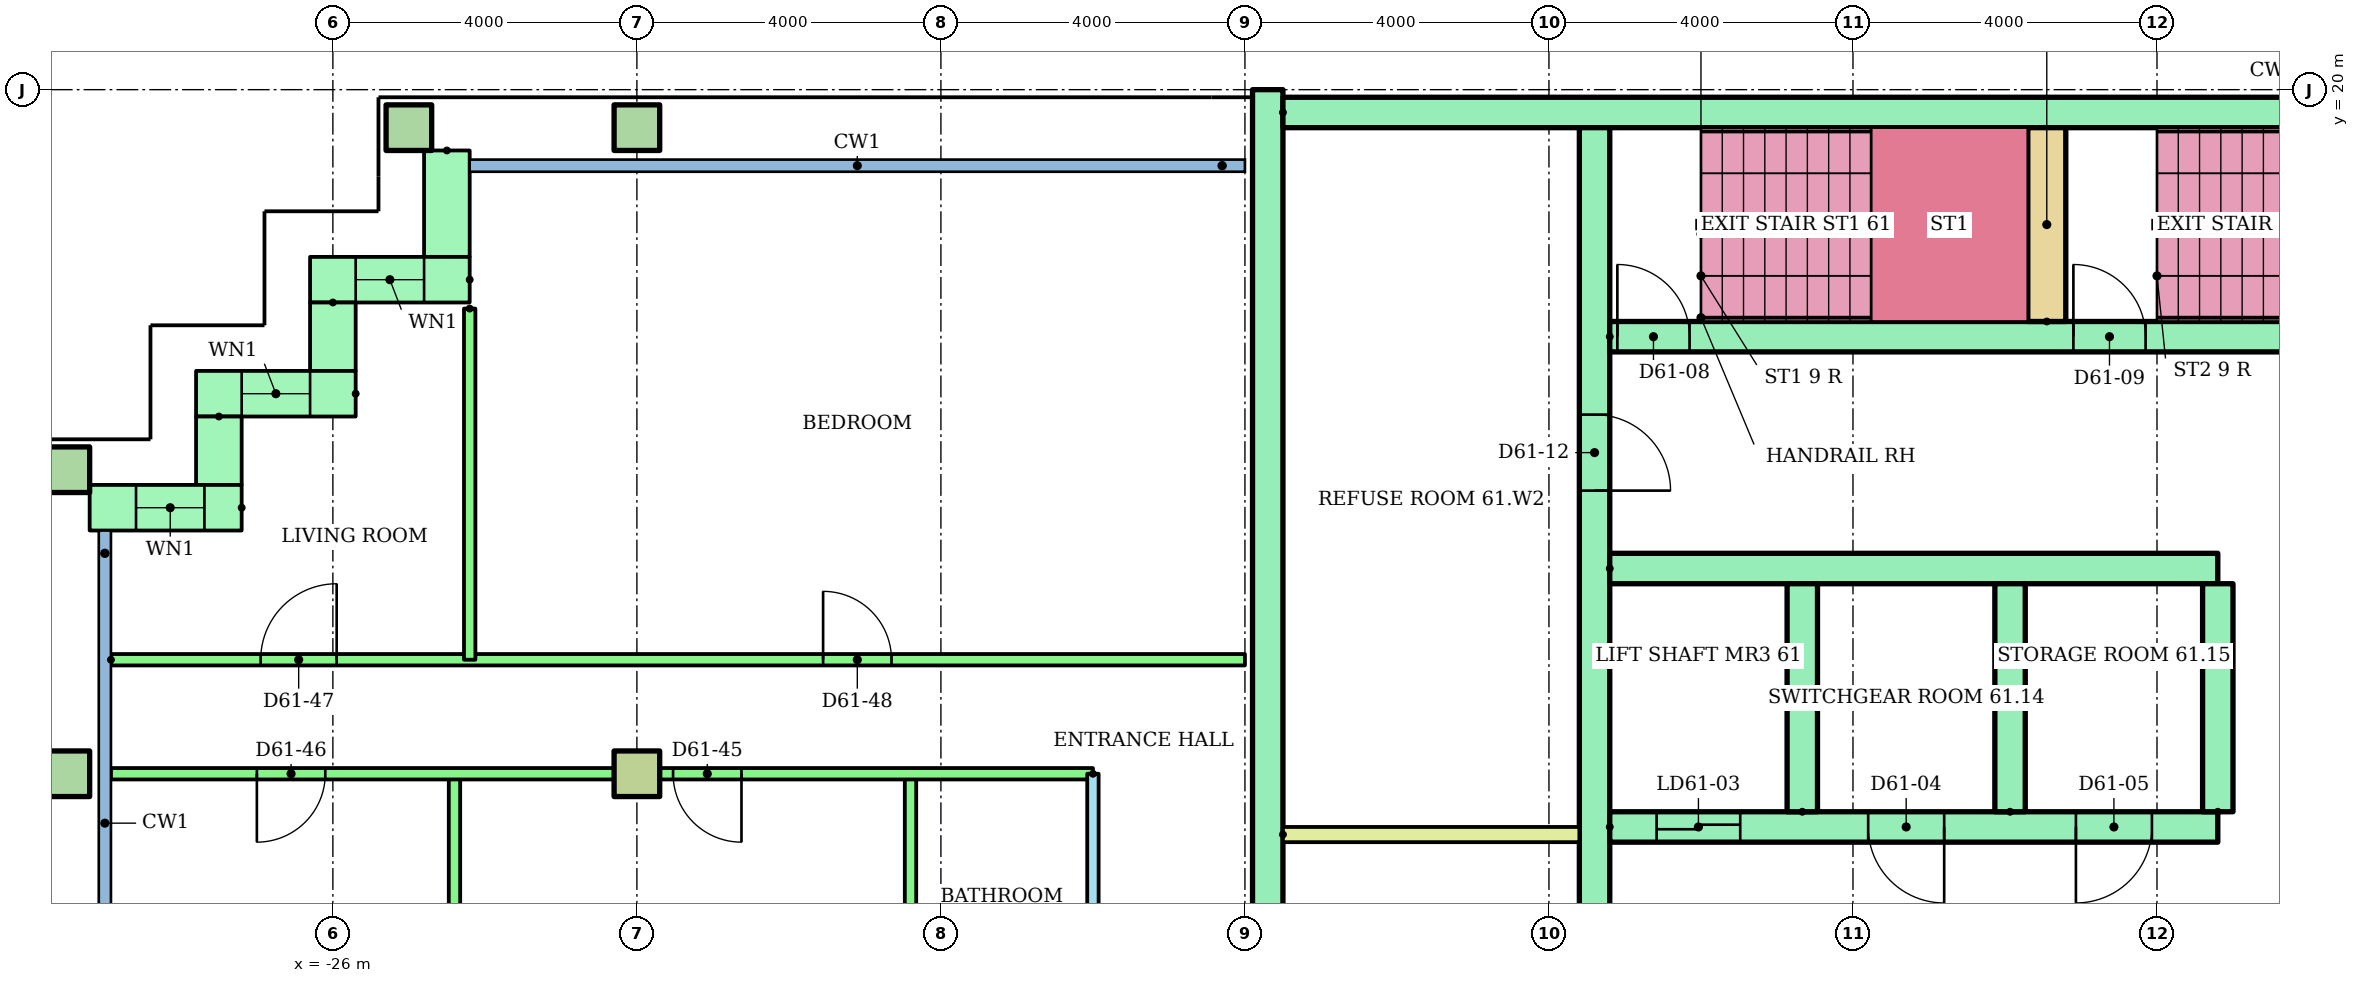
"""IFC4 building model, lengths in metres.
Left out: names, types, materials, properties, quantities, classifications, styles, units other than length and angle.
Written with IfcOpenShell. Run it as: python <this file> out.ifc"""

import sys

from ifc_helpers import new_model, si_unit, direction, frame, frame_2d, origin, origin_2d, place, context, subcontext, project, spatial, rectangle, hollow_rectangle, extrude, element, fill, save


model = new_model("IFC4")
c1 = context("Model", 3, precision=1e-05, world=origin(), true_north=direction((0.0, 1.0)))
c2 = subcontext(c1, "Body", "Model", "MODEL_VIEW")
j1 = project(units=[si_unit("LENGTHUNIT", "METRE"), si_unit("PLANEANGLEUNIT", "RADIAN")], contexts=[c1])
p1 = place(None, origin())
s1 = spatial("IfcSite", under=j1, at=p1, CompositionType="ELEMENT")
p2 = place(p1, origin())
s2 = spatial("IfcBuilding", under=s1, at=p2, CompositionType="ELEMENT")
p3 = place(p2, frame((0.0, 0.0, 233.2)))
s3 = spatial("IfcBuildingStorey", under=s2, at=p3, CompositionType="ELEMENT", Elevation=233.2)
p4 = place(p3, frame((-29.5, 11.0, 0.0)))
e1 = element("IfcColumn", 1, at=p4, inside=s3, PredefinedType="COLUMN", context=c2, shape_type="SweptSolid", body=[
    extrude(hollow_rectangle(XDim=0.6, YDim=0.6, WallThickness=0.03, at=origin_2d()), origin(), (0.0, 0.0, 1.0), 3.2),
])
p5 = place(p3, frame((-22.0, 11.0, 0.0)))
e2 = element("IfcColumn", 2, at=p5, inside=s3, PredefinedType="COLUMN", context=c2, shape_type="SweptSolid", body=[
    extrude(rectangle(XDim=0.6, YDim=0.6, at=origin_2d()), origin(), (0.0, 0.0, 1.0), 3.2),
])
for number, where in (
    (3, (-29.5, 15.0, 0.0)),
    (4, (-25.0, 19.5, 0.0)),
    (5, (-22.0, 19.5, 0.0)),
):
    element("IfcColumn", number, at=place(p3, frame(where)), inside=s3, PredefinedType="COLUMN", context=c2, shape_type="SweptSolid", body=[
        extrude(hollow_rectangle(XDim=0.6, YDim=0.6, WallThickness=0.03, at=origin_2d()), origin(), (0.0, 0.0, 1.0), 3.2),
    ])
p6 = place(p3, frame((-24.5, 19.2, 0.0), z_axis=(0.0, 0.0, 1.0), x_axis=(0.0, -1.0, 0.0)))
e6 = element("IfcWall", 6, at=p6, inside=s3, PredefinedType="STANDARD", context=c2, shape_type="SweptSolid", body=[
    extrude(rectangle(XDim=1.4, YDim=0.6, at=frame_2d((0.7, 0.0))), origin(), (0.0, 0.0, 1.0), 2.92),
])
p7 = place(p3, frame((-24.2, 17.5, 0.0), z_axis=(0.0, 0.0, 1.0), x_axis=(-1.0, 0.0, 0.0)))
e7 = element("IfcWall", 7, at=p7, inside=s3, PredefinedType="STANDARD", context=c2, shape_type="SweptSolid", body=[
    extrude(rectangle(XDim=2.1, YDim=0.6, at=frame_2d((1.05, 0.0))), origin(), (0.0, 0.0, 1.0), 2.92),
])
p8 = place(p7, frame((0.6, 0.0, 0.9)))
e8 = element("IfcOpeningElement", 8, at=p8, cuts=e7, PredefinedType="OPENING", context=c2, shape_type="SweptSolid", body=[
    extrude(rectangle(XDim=0.9, YDim=1.5, at=frame_2d((0.45, 0.75))), frame((0.0, 0.31, 0.0), z_axis=(0.0, -1.0, 0.0), x_axis=(1.0, 0.0, 0.0)), (0.0, 0.0, 1.0), 0.62),
])
p9 = place(p3, frame((-26.0, 17.2, 0.0), z_axis=(0.0, 0.0, 1.0), x_axis=(0.0, -1.0, 0.0)))
e9 = element("IfcWall", 9, at=p9, inside=s3, PredefinedType="STANDARD", context=c2, shape_type="SweptSolid", body=[
    extrude(rectangle(XDim=0.9, YDim=0.6, at=frame_2d((0.45, 0.0))), origin(), (0.0, 0.0, 1.0), 2.92),
])
p10 = place(p3, frame((-25.7, 16.0, 0.0), z_axis=(0.0, 0.0, 1.0), x_axis=(-1.0, 0.0, 0.0)))
e10 = element("IfcWall", 10, at=p10, inside=s3, PredefinedType="STANDARD", context=c2, shape_type="SweptSolid", body=[
    extrude(rectangle(XDim=2.1, YDim=0.6, at=frame_2d((1.05, 0.0))), origin(), (0.0, 0.0, 1.0), 2.92),
])
p11 = place(p10, frame((0.6, 0.0, 0.9)))
e11 = element("IfcOpeningElement", 11, at=p11, cuts=e10, PredefinedType="OPENING", context=c2, shape_type="SweptSolid", body=[
    extrude(rectangle(XDim=0.9, YDim=1.5, at=frame_2d((0.45, 0.75))), frame((0.0, 0.31, 0.0), z_axis=(0.0, -1.0, 0.0), x_axis=(1.0, 0.0, 0.0)), (0.0, 0.0, 1.0), 0.62),
])
p12 = place(p3, frame((-27.5, 15.7, 0.0), z_axis=(0.0, 0.0, 1.0), x_axis=(0.0, -1.0, 0.0)))
e12 = element("IfcWall", 12, at=p12, inside=s3, PredefinedType="STANDARD", context=c2, shape_type="SweptSolid", body=[
    extrude(rectangle(XDim=0.9, YDim=0.6, at=frame_2d((0.45, 0.0))), origin(), (0.0, 0.0, 1.0), 2.92),
])
p13 = place(p3, frame((-27.2, 14.5, 0.0), z_axis=(0.0, 0.0, 1.0), x_axis=(-1.0, 0.0, 0.0)))
e13 = element("IfcWall", 13, at=p13, inside=s3, PredefinedType="STANDARD", context=c2, shape_type="SweptSolid", body=[
    extrude(rectangle(XDim=2.0, YDim=0.6, at=frame_2d((1.0, 0.0))), origin(), (0.0, 0.0, 1.0), 2.92),
])
p14 = place(p13, frame((0.49, 0.0, 0.9)))
e14 = element("IfcOpeningElement", 14, at=p14, cuts=e13, PredefinedType="OPENING", context=c2, shape_type="SweptSolid", body=[
    extrude(rectangle(XDim=0.9, YDim=1.5, at=frame_2d((0.45, 0.75))), frame((0.0, 0.31, 0.0), z_axis=(0.0, -1.0, 0.0), x_axis=(1.0, 0.0, 0.0)), (0.0, 0.0, 1.0), 0.62),
])
p15 = place(p3, frame((-13.7, 3.0, 0.0), z_axis=(0.0, 0.0, 1.0), x_axis=(0.0, 1.0, 0.0)))
e15 = element("IfcWall", 15, at=p15, inside=s3, PredefinedType="SHEAR", context=c2, shape_type="SweptSolid", body=[
    extrude(rectangle(XDim=17.0, YDim=0.4, at=frame_2d((8.5, 0.0))), origin(), (0.0, 0.0, 1.0), 2.92),
])
p16 = place(p3, frame((-13.5, 19.7, 0.0)))
e16 = element("IfcWall", 16, at=p16, inside=s3, PredefinedType="SHEAR", context=c2, shape_type="SweptSolid", body=[
    extrude(rectangle(XDim=27.0, YDim=0.4, at=frame_2d((13.5, 0.0))), origin(), (0.0, 0.0, 1.0), 2.92),
])
p17 = place(p3, frame((-9.4, 6.8, 0.0), z_axis=(0.0, 0.0, 1.0), x_axis=(0.0, 1.0, 0.0)))
e17 = element("IfcWall", 17, at=p17, inside=s3, PredefinedType="SHEAR", context=c2, shape_type="SweptSolid", body=[
    extrude(rectangle(XDim=12.7, YDim=0.4, at=frame_2d((6.35, 0.0))), origin(), (0.0, 0.0, 1.0), 2.92),
])
p18 = place(p17, frame((1.15, 0.0, 0.0)))
e18 = element("IfcOpeningElement", 18, at=p18, cuts=e17, PredefinedType="OPENING", context=c2, shape_type="SweptSolid", body=[
    extrude(rectangle(XDim=1.0, YDim=2.1, at=frame_2d((0.5, 1.05))), frame((0.0, 0.21, 0.0), z_axis=(0.0, -1.0, 0.0), x_axis=(1.0, 0.0, 0.0)), (0.0, 0.0, 1.0), 0.42),
])
p19 = place(p17, frame((7.925, 0.0, 0.0)))
e19 = element("IfcOpeningElement", 19, at=p19, cuts=e17, PredefinedType="OPENING", context=c2, shape_type="SweptSolid", body=[
    extrude(rectangle(XDim=1.0, YDim=2.1, at=frame_2d((0.5, 1.05))), frame((0.0, 0.21, 0.0), z_axis=(0.0, -1.0, 0.0), x_axis=(1.0, 0.0, 0.0)), (0.0, 0.0, 1.0), 0.42),
])
p20 = place(p3, frame((-9.2, 10.3, 0.0)))
e20 = element("IfcWall", 20, at=p20, inside=s3, PredefinedType="SHEAR", context=c2, shape_type="SweptSolid", body=[
    extrude(rectangle(XDim=8.0, YDim=0.4, at=frame_2d((4.0, 0.0))), origin(), (0.0, 0.0, 1.0), 2.92),
])
p21 = place(p20, frame((0.617, 0.0, 0.0)))
e21 = element("IfcOpeningElement", 21, at=p21, cuts=e20, PredefinedType="OPENING", context=c2, shape_type="SweptSolid", body=[
    extrude(rectangle(XDim=1.1, YDim=2.1, at=frame_2d((0.55, 1.05))), frame((0.0, 0.21, 0.0), z_axis=(0.0, -1.0, 0.0), x_axis=(1.0, 0.0, 0.0)), (0.0, 0.0, 1.0), 0.42),
])
p22 = place(p20, frame((3.4, 0.0, 0.0)))
e22 = element("IfcOpeningElement", 22, at=p22, cuts=e20, PredefinedType="OPENING", context=c2, shape_type="SweptSolid", body=[
    extrude(rectangle(XDim=1.0, YDim=2.1, at=frame_2d((0.5, 1.05))), frame((0.0, 0.21, 0.0), z_axis=(0.0, -1.0, 0.0), x_axis=(1.0, 0.0, 0.0)), (0.0, 0.0, 1.0), 0.42),
])
p23 = place(p20, frame((6.133, 0.0, 0.0)))
e23 = element("IfcOpeningElement", 23, at=p23, cuts=e20, PredefinedType="OPENING", context=c2, shape_type="SweptSolid", body=[
    extrude(rectangle(XDim=1.0, YDim=2.1, at=frame_2d((0.5, 1.05))), frame((0.0, 0.21, 0.0), z_axis=(0.0, -1.0, 0.0), x_axis=(1.0, 0.0, 0.0)), (0.0, 0.0, 1.0), 0.42),
])
p24 = place(p3, frame((-9.2, 13.7, 0.0)))
e24 = element("IfcWall", 24, at=p24, inside=s3, PredefinedType="SHEAR", context=c2, shape_type="SweptSolid", body=[
    extrude(rectangle(XDim=8.0, YDim=0.4, at=frame_2d((4.0, 0.0))), origin(), (0.0, 0.0, 1.0), 2.92),
])
for number, where, z_axis, x_axis in (
    (25, (-6.667, 10.5, 0.0), (0.0, 0.0, 1.0), (0.0, 1.0, 0.0)),
    (26, (-3.933, 10.5, 0.0), (0.0, 0.0, 1.0), (0.0, 1.0, 0.0)),
    (27, (-1.2, 10.5, 0.0), (0.0, 0.0, 1.0), (0.0, 1.0, 0.0)),
):
    element("IfcWall", number, at=place(p3, frame(where, z_axis=z_axis, x_axis=x_axis)), inside=s3, PredefinedType="SHEAR", context=c2, shape_type="SweptSolid", body=[
        extrude(rectangle(XDim=3.0, YDim=0.4, at=frame_2d((1.5, 0.0))), origin(), (0.0, 0.0, 1.0), 2.92),
    ])
p25 = place(p3, frame((-9.2, 16.75, 0.0)))
e28 = element("IfcWall", 28, at=p25, inside=s3, PredefinedType="SHEAR", context=c2, shape_type="SweptSolid", body=[
    extrude(rectangle(XDim=18.4, YDim=0.4, at=frame_2d((9.2, 0.0))), origin(), (0.0, 0.0, 1.0), 2.92),
])
p26 = place(p25, frame((0.1, 0.0, 0.0)))
e29 = element("IfcOpeningElement", 29, at=p26, cuts=e28, PredefinedType="OPENING", context=c2, shape_type="SweptSolid", body=[
    extrude(rectangle(XDim=0.95, YDim=2.1, at=frame_2d((0.475, 1.05))), frame((0.0, 0.21, 0.0), z_axis=(0.0, -1.0, 0.0), x_axis=(1.0, 0.0, 0.0)), (0.0, 0.0, 1.0), 0.42),
])
p27 = place(p25, frame((6.1, 0.0, 0.0)))
e30 = element("IfcOpeningElement", 30, at=p27, cuts=e28, PredefinedType="OPENING", context=c2, shape_type="SweptSolid", body=[
    extrude(rectangle(XDim=0.95, YDim=2.1, at=frame_2d((0.475, 1.05))), frame((0.0, 0.21, 0.0), z_axis=(0.0, -1.0, 0.0), x_axis=(1.0, 0.0, 0.0)), (0.0, 0.0, 1.0), 0.42),
])
p28 = place(p25, frame((12.1, 0.0, 0.0)))
e31 = element("IfcOpeningElement", 31, at=p28, cuts=e28, PredefinedType="OPENING", context=c2, shape_type="SweptSolid", body=[
    extrude(rectangle(XDim=0.95, YDim=2.1, at=frame_2d((0.475, 1.05))), frame((0.0, 0.21, 0.0), z_axis=(0.0, -1.0, 0.0), x_axis=(1.0, 0.0, 0.0)), (0.0, 0.0, 1.0), 0.42),
])
p29 = place(p3, frame((-3.45, 16.95, 0.0), z_axis=(0.0, 0.0, 1.0), x_axis=(0.0, 1.0, 0.0)))
e32 = element("IfcWall", 32, at=p29, inside=s3, PredefinedType="SHEAR", context=c2, shape_type="SweptSolid", body=[
    extrude(rectangle(XDim=2.55, YDim=0.5, at=frame_2d((1.275, 0.0))), origin(), (0.0, 0.0, 1.0), 2.92),
])
p30 = place(p3, frame((-13.5, 10.2, 0.0)))
e33 = element("IfcWall", 33, at=p30, inside=s3, PredefinedType="PARTITIONING", context=c2, shape_type="SweptSolid", body=[
    extrude(rectangle(XDim=3.9, YDim=0.2, at=frame_2d((1.95, 0.0))), origin(), (0.0, 0.0, 1.0), 2.92),
])
p31 = place(p3, frame((-16.0, 1.4, 0.0), z_axis=(0.0, 0.0, 1.0), x_axis=(0.0, 1.0, 0.0)))
e34 = element("IfcWall", 34, at=p31, inside=s3, PredefinedType="PARTITIONING", context=c2, shape_type="SweptSolid", body=[
    extrude(rectangle(XDim=9.6, YDim=0.15, at=frame_2d((4.8, 0.0))), origin(), (0.0, 0.0, 1.0), 2.4),
])
p32 = place(p31, frame((2.175, 0.0, 0.0)))
e35 = element("IfcOpeningElement", 35, at=p32, cuts=e34, PredefinedType="OPENING", context=c2, shape_type="SweptSolid", body=[
    extrude(rectangle(XDim=0.9, YDim=2.1, at=frame_2d((0.45, 1.05))), frame((0.0, 0.085, 0.0), z_axis=(0.0, -1.0, 0.0), x_axis=(1.0, 0.0, 0.0)), (0.0, 0.0, 1.0), 0.17),
])
p33 = place(p31, frame((7.025, 0.0, 0.0)))
e36 = element("IfcOpeningElement", 36, at=p33, cuts=e34, PredefinedType="OPENING", context=c2, shape_type="SweptSolid", body=[
    extrude(rectangle(XDim=0.8, YDim=2.1, at=frame_2d((0.4, 1.05))), frame((0.0, 0.085, 0.0), z_axis=(0.0, -1.0, 0.0), x_axis=(1.0, 0.0, 0.0)), (0.0, 0.0, 1.0), 0.17),
])
for number, where, z_axis, x_axis in (
    (37, (-18.4, 1.4, 0.0), (0.0, 0.0, 1.0), (0.0, 1.0, 0.0)),
    (38, (-24.4, 1.4, 0.0), (0.0, 0.0, 1.0), (0.0, 1.0, 0.0)),
):
    element("IfcWall", number, at=place(p3, frame(where, z_axis=z_axis, x_axis=x_axis)), inside=s3, PredefinedType="PARTITIONING", context=c2, shape_type="SweptSolid", body=[
        extrude(rectangle(XDim=9.6, YDim=0.15, at=frame_2d((4.8, 0.0))), origin(), (0.0, 0.0, 1.0), 2.4),
    ])
p34 = place(p3, frame((-16.0, 11.0, 0.0), z_axis=(0.0, 0.0, 1.0), x_axis=(-1.0, 0.0, 0.0)))
e39 = element("IfcWall", 39, at=p34, inside=s3, PredefinedType="PARTITIONING", context=c2, shape_type="SweptSolid", body=[
    extrude(rectangle(XDim=12.92, YDim=0.15, at=frame_2d((6.46, 0.0))), origin(), (0.0, 0.0, 1.0), 2.4),
])
p35 = place(p34, frame((4.624, 0.0, 0.0)))
e40 = element("IfcOpeningElement", 40, at=p35, cuts=e39, PredefinedType="OPENING", context=c2, shape_type="SweptSolid", body=[
    extrude(rectangle(XDim=0.9, YDim=2.1, at=frame_2d((0.45, 1.05))), frame((0.0, 0.085, 0.0), z_axis=(0.0, -1.0, 0.0), x_axis=(1.0, 0.0, 0.0)), (0.0, 0.0, 1.0), 0.17),
])
p36 = place(p34, frame((10.1, 0.0, 0.0)))
e41 = element("IfcOpeningElement", 41, at=p36, cuts=e39, PredefinedType="OPENING", context=c2, shape_type="SweptSolid", body=[
    extrude(rectangle(XDim=0.9, YDim=2.1, at=frame_2d((0.45, 1.05))), frame((0.0, 0.085, 0.0), z_axis=(0.0, -1.0, 0.0), x_axis=(1.0, 0.0, 0.0)), (0.0, 0.0, 1.0), 0.17),
])
p37 = place(p3, frame((-28.92, 12.5, 0.0)))
e42 = element("IfcWall", 42, at=p37, inside=s3, PredefinedType="PARTITIONING", context=c2, shape_type="SweptSolid", body=[
    extrude(rectangle(XDim=14.92, YDim=0.15, at=frame_2d((7.46, 0.0))), origin(), (0.0, 0.0, 1.0), 2.4),
])
p38 = place(p37, frame((1.97, 0.0, 0.0)))
e43 = element("IfcOpeningElement", 43, at=p38, cuts=e42, PredefinedType="OPENING", context=c2, shape_type="SweptSolid", body=[
    extrude(rectangle(XDim=1.0, YDim=2.1, at=frame_2d((0.5, 1.05))), frame((0.0, 0.085, 0.0), z_axis=(0.0, -1.0, 0.0), x_axis=(1.0, 0.0, 0.0)), (0.0, 0.0, 1.0), 0.17),
])
p39 = place(p37, frame((9.37, 0.0, 0.0)))
e44 = element("IfcOpeningElement", 44, at=p39, cuts=e42, PredefinedType="OPENING", context=c2, shape_type="SweptSolid", body=[
    extrude(rectangle(XDim=0.9, YDim=2.1, at=frame_2d((0.45, 1.05))), frame((0.0, 0.085, 0.0), z_axis=(0.0, -1.0, 0.0), x_axis=(1.0, 0.0, 0.0)), (0.0, 0.0, 1.0), 0.17),
])
p40 = place(p3, frame((-24.2, 17.12, 0.0), z_axis=(0.0, 0.0, 1.0), x_axis=(0.0, -1.0, 0.0)))
e45 = element("IfcWall", 45, at=p40, inside=s3, PredefinedType="PARTITIONING", context=c2, shape_type="SweptSolid", body=[
    extrude(rectangle(XDim=4.62, YDim=0.15, at=frame_2d((2.31, 0.0))), origin(), (0.0, 0.0, 1.0), 2.4),
])
p41 = place(p8, origin())
e46 = element("IfcWindow", 46, at=p41, inside=s3, PartitioningType="SINGLE_PANEL", PredefinedType="WINDOW", context=c2, shape_type="SweptSolid", body=[
    extrude(rectangle(XDim=0.9, YDim=1.5, at=frame_2d((0.45, 0.75))), frame((0.0, 0.03, 0.0), z_axis=(0.0, -1.0, 0.0), x_axis=(1.0, 0.0, 0.0)), (0.0, 0.0, 1.0), 0.06),
])
fill(e8, e46)
p42 = place(p11, origin())
e47 = element("IfcWindow", 47, at=p42, inside=s3, PartitioningType="SINGLE_PANEL", PredefinedType="WINDOW", context=c2, shape_type="SweptSolid", body=[
    extrude(rectangle(XDim=0.9, YDim=1.5, at=frame_2d((0.45, 0.75))), frame((0.0, 0.03, 0.0), z_axis=(0.0, -1.0, 0.0), x_axis=(1.0, 0.0, 0.0)), (0.0, 0.0, 1.0), 0.06),
])
fill(e11, e47)
p43 = place(p14, origin())
e48 = element("IfcWindow", 48, at=p43, inside=s3, PartitioningType="SINGLE_PANEL", PredefinedType="WINDOW", context=c2, shape_type="SweptSolid", body=[
    extrude(rectangle(XDim=0.9, YDim=1.5, at=frame_2d((0.45, 0.75))), frame((0.0, 0.03, 0.0), z_axis=(0.0, -1.0, 0.0), x_axis=(1.0, 0.0, 0.0)), (0.0, 0.0, 1.0), 0.06),
])
fill(e14, e48)
p44 = place(p21, origin())
e49 = element("IfcDoor", 49, at=p44, inside=s3, OperationType="SLIDING_TO_LEFT", PredefinedType="DOOR", context=c2, shape_type="SweptSolid", body=[
    extrude(rectangle(XDim=1.1, YDim=2.1, at=frame_2d((0.55, 1.05))), frame((0.0, 0.025, 0.0), z_axis=(0.0, -1.0, 0.0), x_axis=(1.0, 0.0, 0.0)), (0.0, 0.0, 1.0), 0.05),
])
fill(e21, e49)
p45 = place(p22, frame((1.0, 0.0, 0.0), z_axis=(0.0, 0.0, 1.0), x_axis=(-1.0, 0.0, 0.0)))
e50 = element("IfcDoor", 50, at=p45, inside=s3, OperationType="SINGLE_SWING_RIGHT", PredefinedType="DOOR", context=c2, shape_type="SweptSolid", body=[
    extrude(rectangle(XDim=1.0, YDim=2.1, at=frame_2d((0.5, 1.05))), frame((0.0, 0.025, 0.0), z_axis=(0.0, -1.0, 0.0), x_axis=(1.0, 0.0, 0.0)), (0.0, 0.0, 1.0), 0.05),
])
fill(e22, e50)
p46 = place(p23, frame((1.0, 0.0, 0.0), z_axis=(0.0, 0.0, 1.0), x_axis=(-1.0, 0.0, 0.0)))
e51 = element("IfcDoor", 51, at=p46, inside=s3, OperationType="SINGLE_SWING_LEFT", PredefinedType="DOOR", context=c2, shape_type="SweptSolid", body=[
    extrude(rectangle(XDim=1.0, YDim=2.1, at=frame_2d((0.5, 1.05))), frame((0.0, 0.025, 0.0), z_axis=(0.0, -1.0, 0.0), x_axis=(1.0, 0.0, 0.0)), (0.0, 0.0, 1.0), 0.05),
])
fill(e23, e51)
p47 = place(p26, origin())
e52 = element("IfcDoor", 52, at=p47, inside=s3, OperationType="SINGLE_SWING_LEFT", PredefinedType="DOOR", context=c2, shape_type="SweptSolid", body=[
    extrude(rectangle(XDim=0.95, YDim=2.1, at=frame_2d((0.475, 1.05))), frame((0.0, 0.025, 0.0), z_axis=(0.0, -1.0, 0.0), x_axis=(1.0, 0.0, 0.0)), (0.0, 0.0, 1.0), 0.05),
])
fill(e29, e52)
p48 = place(p27, origin())
e53 = element("IfcDoor", 53, at=p48, inside=s3, OperationType="SINGLE_SWING_LEFT", PredefinedType="DOOR", context=c2, shape_type="SweptSolid", body=[
    extrude(rectangle(XDim=0.95, YDim=2.1, at=frame_2d((0.475, 1.05))), frame((0.0, 0.025, 0.0), z_axis=(0.0, -1.0, 0.0), x_axis=(1.0, 0.0, 0.0)), (0.0, 0.0, 1.0), 0.05),
])
fill(e30, e53)
p49 = place(p19, frame((1.0, 0.0, 0.0), z_axis=(0.0, 0.0, 1.0), x_axis=(-1.0, 0.0, 0.0)))
e54 = element("IfcDoor", 54, at=p49, inside=s3, OperationType="SINGLE_SWING_LEFT", PredefinedType="DOOR", context=c2, shape_type="SweptSolid", body=[
    extrude(rectangle(XDim=1.0, YDim=2.1, at=frame_2d((0.5, 1.05))), frame((0.0, 0.025, 0.0), z_axis=(0.0, -1.0, 0.0), x_axis=(1.0, 0.0, 0.0)), (0.0, 0.0, 1.0), 0.05),
])
fill(e19, e54)
p50 = place(p35, origin())
e55 = element("IfcDoor", 55, at=p50, inside=s3, OperationType="SINGLE_SWING_LEFT", PredefinedType="DOOR", context=c2, shape_type="SweptSolid", body=[
    extrude(rectangle(XDim=0.9, YDim=2.1, at=frame_2d((0.45, 1.05))), frame((0.0, 0.025, 0.0), z_axis=(0.0, -1.0, 0.0), x_axis=(1.0, 0.0, 0.0)), (0.0, 0.0, 1.0), 0.05),
])
fill(e40, e55)
p51 = place(p36, origin())
e56 = element("IfcDoor", 56, at=p51, inside=s3, OperationType="SINGLE_SWING_RIGHT", PredefinedType="DOOR", context=c2, shape_type="SweptSolid", body=[
    extrude(rectangle(XDim=0.9, YDim=2.1, at=frame_2d((0.45, 1.05))), frame((0.0, 0.025, 0.0), z_axis=(0.0, -1.0, 0.0), x_axis=(1.0, 0.0, 0.0)), (0.0, 0.0, 1.0), 0.05),
])
fill(e41, e56)
p52 = place(p38, origin())
e57 = element("IfcDoor", 57, at=p52, inside=s3, OperationType="SINGLE_SWING_RIGHT", PredefinedType="DOOR", context=c2, shape_type="SweptSolid", body=[
    extrude(rectangle(XDim=1.0, YDim=2.1, at=frame_2d((0.5, 1.05))), frame((0.0, 0.025, 0.0), z_axis=(0.0, -1.0, 0.0), x_axis=(1.0, 0.0, 0.0)), (0.0, 0.0, 1.0), 0.05),
])
fill(e43, e57)
p53 = place(p39, origin())
e58 = element("IfcDoor", 58, at=p53, inside=s3, OperationType="SINGLE_SWING_LEFT", PredefinedType="DOOR", context=c2, shape_type="SweptSolid", body=[
    extrude(rectangle(XDim=0.9, YDim=2.1, at=frame_2d((0.45, 1.05))), frame((0.0, 0.025, 0.0), z_axis=(0.0, -1.0, 0.0), x_axis=(1.0, 0.0, 0.0)), (0.0, 0.0, 1.0), 0.05),
])
fill(e44, e58)
save(model, sys.argv[1])
